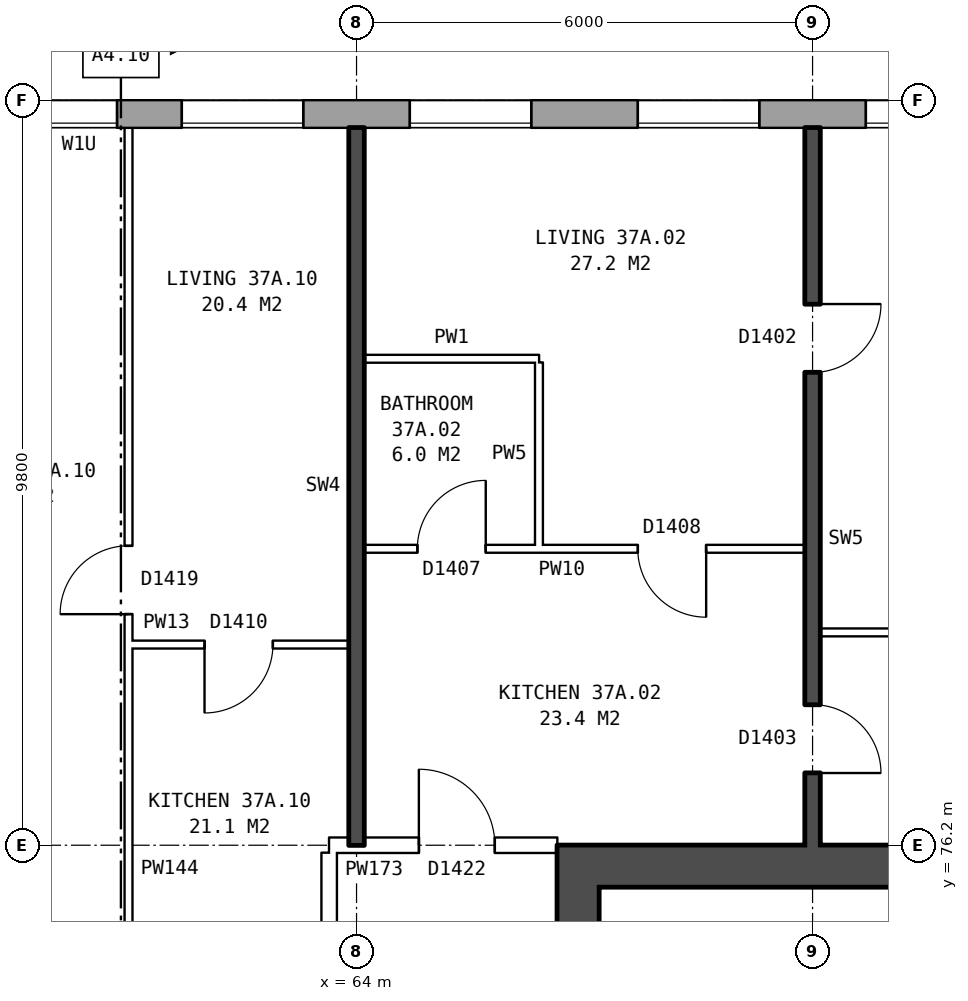
"""IFC4 building model, lengths in metres.
Left out: names, types, materials, properties, quantities, classifications, styles, units other than length and angle.
Written with IfcOpenShell. Run it as: python <this file> out.ifc"""

import sys

from ifc_helpers import new_model, si_unit, direction, frame, frame_2d, origin, place, context, subcontext, project, spatial, rectangle, extrude, element, fill, save


model = new_model("IFC4")
c1 = context("Model", 3, precision=1e-05, world=origin(), true_north=direction((0.0, 1.0)))
c2 = subcontext(c1, "Body", "Model", "MODEL_VIEW")
j1 = project(units=[si_unit("LENGTHUNIT", "METRE"), si_unit("PLANEANGLEUNIT", "RADIAN")], contexts=[c1])
p1 = place(None, origin())
s1 = spatial("IfcSite", under=j1, at=p1, CompositionType="ELEMENT")
p2 = place(p1, origin())
s2 = spatial("IfcBuilding", under=s1, at=p2, CompositionType="ELEMENT")
p3 = place(p2, frame((0.0, 0.0, 133.0)))
s3 = spatial("IfcBuildingStorey", under=s2, at=p3, CompositionType="ELEMENT", Elevation=133.0)
p4 = place(p3, frame((72.925, 85.82, 0.0), z_axis=(0.0, 0.0, 1.0), x_axis=(-1.0, 0.0, 0.0)))
e1 = element("IfcWall", 1, at=p4, inside=s3, PredefinedType="STANDARD", context=c2, shape_type="SweptSolid", body=[
    extrude(rectangle(XDim=43.101, YDim=0.36, at=frame_2d((21.55, 0.0))), origin(), (0.0, 0.0, 1.0), 2.85),
])
p5 = place(p4, frame((0.625, 0.0, 0.8)))
e2 = element("IfcOpeningElement", 2, at=p5, cuts=e1, PredefinedType="OPENING", context=c2, shape_type="SweptSolid", body=[
    extrude(rectangle(XDim=1.6, YDim=1.8, at=frame_2d((0.8, 0.9))), frame((0.0, 0.19, 0.0), z_axis=(0.0, -1.0, 0.0), x_axis=(1.0, 0.0, 0.0)), (0.0, 0.0, 1.0), 0.38),
])
p6 = place(p4, frame((3.625, 0.0, 0.8)))
e3 = element("IfcOpeningElement", 3, at=p6, cuts=e1, PredefinedType="OPENING", context=c2, shape_type="SweptSolid", body=[
    extrude(rectangle(XDim=1.6, YDim=1.8, at=frame_2d((0.8, 0.9))), frame((0.0, 0.19, 0.0), z_axis=(0.0, -1.0, 0.0), x_axis=(1.0, 0.0, 0.0)), (0.0, 0.0, 1.0), 0.38),
])
p7 = place(p4, frame((6.625, 0.0, 0.8)))
e4 = element("IfcOpeningElement", 4, at=p7, cuts=e1, PredefinedType="OPENING", context=c2, shape_type="SweptSolid", body=[
    extrude(rectangle(XDim=1.6, YDim=1.8, at=frame_2d((0.8, 0.9))), frame((0.0, 0.19, 0.0), z_axis=(0.0, -1.0, 0.0), x_axis=(1.0, 0.0, 0.0)), (0.0, 0.0, 1.0), 0.38),
])
p8 = place(p4, frame((9.625, 0.0, 0.8)))
e5 = element("IfcOpeningElement", 5, at=p8, cuts=e1, PredefinedType="OPENING", context=c2, shape_type="SweptSolid", body=[
    extrude(rectangle(XDim=1.6, YDim=1.8, at=frame_2d((0.8, 0.9))), frame((0.0, 0.19, 0.0), z_axis=(0.0, -1.0, 0.0), x_axis=(1.0, 0.0, 0.0)), (0.0, 0.0, 1.0), 0.38),
])
p9 = place(p4, frame((12.075, 0.0, 1.65)))
e6 = element("IfcOpeningElement", 6, at=p9, cuts=e1, PredefinedType="OPENING", context=c2, shape_type="SweptSolid", body=[
    extrude(rectangle(XDim=1.0, YDim=0.9, at=frame_2d((0.5, 0.45))), frame((0.0, 0.19, 0.0), z_axis=(0.0, -1.0, 0.0), x_axis=(1.0, 0.0, 0.0)), (0.0, 0.0, 1.0), 0.38),
])
p10 = place(p4, frame((15.625, 0.0, 0.8)))
e7 = element("IfcOpeningElement", 7, at=p10, cuts=e1, PredefinedType="OPENING", context=c2, shape_type="SweptSolid", body=[
    extrude(rectangle(XDim=1.6, YDim=1.8, at=frame_2d((0.8, 0.9))), frame((0.0, 0.19, 0.0), z_axis=(0.0, -1.0, 0.0), x_axis=(1.0, 0.0, 0.0)), (0.0, 0.0, 1.0), 0.38),
])
p11 = place(p4, frame((18.625, 0.0, 0.8)))
e8 = element("IfcOpeningElement", 8, at=p11, cuts=e1, PredefinedType="OPENING", context=c2, shape_type="SweptSolid", body=[
    extrude(rectangle(XDim=1.6, YDim=1.8, at=frame_2d((0.8, 0.9))), frame((0.0, 0.19, 0.0), z_axis=(0.0, -1.0, 0.0), x_axis=(1.0, 0.0, 0.0)), (0.0, 0.0, 1.0), 0.38),
])
p12 = place(p4, frame((21.625, 0.0, 0.8)))
e9 = element("IfcOpeningElement", 9, at=p12, cuts=e1, PredefinedType="OPENING", context=c2, shape_type="SweptSolid", body=[
    extrude(rectangle(XDim=1.6, YDim=1.8, at=frame_2d((0.8, 0.9))), frame((0.0, 0.19, 0.0), z_axis=(0.0, -1.0, 0.0), x_axis=(1.0, 0.0, 0.0)), (0.0, 0.0, 1.0), 0.38),
])
p13 = place(p4, frame((24.625, 0.0, 0.8)))
e10 = element("IfcOpeningElement", 10, at=p13, cuts=e1, PredefinedType="OPENING", context=c2, shape_type="SweptSolid", body=[
    extrude(rectangle(XDim=1.6, YDim=1.8, at=frame_2d((0.8, 0.9))), frame((0.0, 0.19, 0.0), z_axis=(0.0, -1.0, 0.0), x_axis=(1.0, 0.0, 0.0)), (0.0, 0.0, 1.0), 0.38),
])
p14 = place(p4, frame((27.125, 0.0, 0.8)))
e11 = element("IfcOpeningElement", 11, at=p14, cuts=e1, PredefinedType="OPENING", context=c2, shape_type="SweptSolid", body=[
    extrude(rectangle(XDim=0.6, YDim=1.8, at=frame_2d((0.3, 0.9))), frame((0.0, 0.19, 0.0), z_axis=(0.0, -1.0, 0.0), x_axis=(1.0, 0.0, 0.0)), (0.0, 0.0, 1.0), 0.38),
])
p15 = place(p4, frame((30.625, 0.0, 0.8)))
e12 = element("IfcOpeningElement", 12, at=p15, cuts=e1, PredefinedType="OPENING", context=c2, shape_type="SweptSolid", body=[
    extrude(rectangle(XDim=1.6, YDim=1.8, at=frame_2d((0.8, 0.9))), frame((0.0, 0.19, 0.0), z_axis=(0.0, -1.0, 0.0), x_axis=(1.0, 0.0, 0.0)), (0.0, 0.0, 1.0), 0.38),
])
p16 = place(p4, frame((33.625, 0.0, 0.8)))
e13 = element("IfcOpeningElement", 13, at=p16, cuts=e1, PredefinedType="OPENING", context=c2, shape_type="SweptSolid", body=[
    extrude(rectangle(XDim=1.6, YDim=1.8, at=frame_2d((0.8, 0.9))), frame((0.0, 0.19, 0.0), z_axis=(0.0, -1.0, 0.0), x_axis=(1.0, 0.0, 0.0)), (0.0, 0.0, 1.0), 0.38),
])
p17 = place(p4, frame((36.625, 0.0, 0.8)))
e14 = element("IfcOpeningElement", 14, at=p17, cuts=e1, PredefinedType="OPENING", context=c2, shape_type="SweptSolid", body=[
    extrude(rectangle(XDim=1.6, YDim=1.8, at=frame_2d((0.8, 0.9))), frame((0.0, 0.19, 0.0), z_axis=(0.0, -1.0, 0.0), x_axis=(1.0, 0.0, 0.0)), (0.0, 0.0, 1.0), 0.38),
])
p18 = place(p4, frame((39.625, 0.0, 0.8)))
e15 = element("IfcOpeningElement", 15, at=p18, cuts=e1, PredefinedType="OPENING", context=c2, shape_type="SweptSolid", body=[
    extrude(rectangle(XDim=1.6, YDim=1.8, at=frame_2d((0.8, 0.9))), frame((0.0, 0.19, 0.0), z_axis=(0.0, -1.0, 0.0), x_axis=(1.0, 0.0, 0.0)), (0.0, 0.0, 1.0), 0.38),
])
p19 = place(p4, frame((13.875, 0.0, 0.15)))
e16 = element("IfcOpeningElement", 16, at=p19, cuts=e1, PredefinedType="OPENING", context=c2, shape_type="SweptSolid", body=[
    extrude(rectangle(XDim=0.8, YDim=1.2, at=frame_2d((0.4, 0.6))), frame((0.0, 0.19, 0.0), z_axis=(0.0, -1.0, 0.0), x_axis=(1.0, 0.0, 0.0)), (0.0, 0.0, 1.0), 0.38),
])
p20 = place(p4, frame((28.025, 0.0, 0.8)))
e17 = element("IfcOpeningElement", 17, at=p20, cuts=e1, PredefinedType="OPENING", context=c2, shape_type="SweptSolid", body=[
    extrude(rectangle(XDim=0.8, YDim=0.9, at=frame_2d((0.4, 0.45))), frame((0.0, 0.19, 0.0), z_axis=(0.0, -1.0, 0.0), x_axis=(1.0, 0.0, 0.0)), (0.0, 0.0, 1.0), 0.38),
])
p21 = place(p3, frame((66.915, 63.8, 0.0), z_axis=(0.0, 0.0, 1.0), x_axis=(0.0, 1.0, 0.0)))
e18 = element("IfcWall", 18, at=p21, inside=s3, PredefinedType="SHEAR", context=c2, shape_type="SweptSolid", body=[
    extrude(rectangle(XDim=12.4, YDim=0.55, at=frame_2d((6.2, 0.0))), origin(), (0.0, 0.0, 1.0), 2.85),
])
p22 = place(p21, frame((1.325, 0.0, 0.0)))
e19 = element("IfcOpeningElement", 19, at=p22, cuts=e18, PredefinedType="OPENING", context=c2, shape_type="SweptSolid", body=[
    extrude(rectangle(XDim=1.1, YDim=2.1, at=frame_2d((0.55, 1.05))), frame((0.0, 0.285, 0.0), z_axis=(0.0, -1.0, 0.0), x_axis=(1.0, 0.0, 0.0)), (0.0, 0.0, 1.0), 0.57),
])
p23 = place(p21, frame((3.6, 0.0, 0.0)))
e20 = element("IfcOpeningElement", 20, at=p23, cuts=e18, PredefinedType="OPENING", context=c2, shape_type="SweptSolid", body=[
    extrude(rectangle(XDim=1.1, YDim=2.1, at=frame_2d((0.55, 1.05))), frame((0.0, 0.285, 0.0), z_axis=(0.0, -1.0, 0.0), x_axis=(1.0, 0.0, 0.0)), (0.0, 0.0, 1.0), 0.57),
])
p24 = place(p21, frame((5.8, 0.0, 0.0)))
e21 = element("IfcOpeningElement", 21, at=p24, cuts=e18, PredefinedType="OPENING", context=c2, shape_type="SweptSolid", body=[
    extrude(rectangle(XDim=1.1, YDim=2.1, at=frame_2d((0.55, 1.05))), frame((0.0, 0.285, 0.0), z_axis=(0.0, -1.0, 0.0), x_axis=(1.0, 0.0, 0.0)), (0.0, 0.0, 1.0), 0.57),
])
p25 = place(p21, frame((8.0, 0.0, 0.0)))
e22 = element("IfcOpeningElement", 22, at=p25, cuts=e18, PredefinedType="OPENING", context=c2, shape_type="SweptSolid", body=[
    extrude(rectangle(XDim=1.1, YDim=2.1, at=frame_2d((0.55, 1.05))), frame((0.0, 0.285, 0.0), z_axis=(0.0, -1.0, 0.0), x_axis=(1.0, 0.0, 0.0)), (0.0, 0.0, 1.0), 0.57),
])
p26 = place(p21, frame((9.9, 0.0, 0.0)))
e23 = element("IfcOpeningElement", 23, at=p26, cuts=e18, PredefinedType="OPENING", context=c2, shape_type="SweptSolid", body=[
    extrude(rectangle(XDim=1.1, YDim=2.1, at=frame_2d((0.55, 1.05))), frame((0.0, 0.285, 0.0), z_axis=(0.0, -1.0, 0.0), x_axis=(1.0, 0.0, 0.0)), (0.0, 0.0, 1.0), 0.57),
])
p27 = place(p3, frame((67.19, 75.925, 0.0), z_axis=(0.0, 0.0, 1.0), x_axis=(1.0, 0.0, 0.0)))
e24 = element("IfcWall", 24, at=p27, inside=s3, PredefinedType="SHEAR", context=c2, shape_type="SweptSolid", body=[
    extrude(rectangle(XDim=7.9, YDim=0.55, at=frame_2d((3.95, 0.0))), origin(), (0.0, 0.0, 1.0), 2.85),
])
p28 = place(p3, frame((63.64, 63.9, 0.0), z_axis=(0.0, 0.0, 1.0), x_axis=(0.0, 1.0, 0.0)))
e25 = element("IfcWall", 25, at=p28, inside=s3, PredefinedType="PARTITIONING", context=c2, shape_type="SweptSolid", body=[
    extrude(rectangle(XDim=12.2, YDim=0.2, at=frame_2d((6.1, 0.0))), origin(), (0.0, 0.0, 1.0), 2.85),
])
p29 = place(p28, frame((5.1, 0.0, 0.0)))
e26 = element("IfcOpeningElement", 26, at=p29, cuts=e25, PredefinedType="OPENING", context=c2, shape_type="SweptSolid", body=[
    extrude(rectangle(XDim=2.0, YDim=2.1, at=frame_2d((1.0, 1.05))), frame((0.0, 0.11, 0.0), z_axis=(0.0, -1.0, 0.0), x_axis=(1.0, 0.0, 0.0)), (0.0, 0.0, 1.0), 0.22),
])
p30 = place(p3, frame((63.64, 76.2, 0.0), z_axis=(0.0, 0.0, 1.0), x_axis=(1.0, 0.0, 0.0)))
e27 = element("IfcWall", 27, at=p30, inside=s3, PredefinedType="PARTITIONING", context=c2, shape_type="SweptSolid", body=[
    extrude(rectangle(XDim=3.0, YDim=0.2, at=frame_2d((1.5, 0.0))), origin(), (0.0, 0.0, 1.0), 2.85),
])
p31 = place(p30, frame((1.18, 0.0, 0.0)))
e28 = element("IfcOpeningElement", 28, at=p31, cuts=e27, PredefinedType="OPENING", context=c2, shape_type="SweptSolid", body=[
    extrude(rectangle(XDim=1.0, YDim=2.1, at=frame_2d((0.5, 1.05))), frame((0.0, 0.11, 0.0), z_axis=(0.0, -1.0, 0.0), x_axis=(1.0, 0.0, 0.0)), (0.0, 0.0, 1.0), 0.22),
])
p32 = place(p3, frame((61.0, 78.84, 0.0), z_axis=(0.0, 0.0, 1.0), x_axis=(1.0, 0.0, 0.0)))
e29 = element("IfcWall", 29, at=p32, inside=s3, PredefinedType="PARTITIONING", context=c2, shape_type="SweptSolid", body=[
    extrude(rectangle(XDim=2.9, YDim=0.1, at=frame_2d((1.45, 0.0))), origin(), (0.0, 0.0, 1.0), 2.85),
])
p33 = place(p32, frame((1.0, 0.0, 0.0)))
e30 = element("IfcOpeningElement", 30, at=p33, cuts=e29, PredefinedType="OPENING", context=c2, shape_type="SweptSolid", body=[
    extrude(rectangle(XDim=0.9, YDim=2.1, at=frame_2d((0.45, 1.05))), frame((0.0, 0.06, 0.0), z_axis=(0.0, -1.0, 0.0), x_axis=(1.0, 0.0, 0.0)), (0.0, 0.0, 1.0), 0.12),
])
p34 = place(p3, frame((70.1, 79.0, 0.0), z_axis=(0.0, 0.0, 1.0), x_axis=(1.0, 0.0, 0.0)))
e31 = element("IfcWall", 31, at=p34, inside=s3, PredefinedType="PARTITIONING", context=c2, shape_type="SweptSolid", body=[
    extrude(rectangle(XDim=5.54, YDim=0.1, at=frame_2d((2.77, 0.0))), origin(), (0.0, 0.0, 1.0), 2.85),
])
p35 = place(p3, frame((64.1, 80.1, 0.0), z_axis=(0.0, 0.0, 1.0), x_axis=(1.0, 0.0, 0.0)))
e32 = element("IfcWall", 32, at=p35, inside=s3, PredefinedType="PARTITIONING", context=c2, shape_type="SweptSolid", body=[
    extrude(rectangle(XDim=5.8, YDim=0.1, at=frame_2d((2.9, 0.0))), origin(), (0.0, 0.0, 1.0), 2.85),
])
p36 = place(p35, frame((3.6, 0.0, 0.0)))
e33 = element("IfcOpeningElement", 33, at=p36, cuts=e32, PredefinedType="OPENING", context=c2, shape_type="SweptSolid", body=[
    extrude(rectangle(XDim=0.9, YDim=2.1, at=frame_2d((0.45, 1.05))), frame((0.0, 0.06, 0.0), z_axis=(0.0, -1.0, 0.0), x_axis=(1.0, 0.0, 0.0)), (0.0, 0.0, 1.0), 0.12),
])
p37 = place(p35, frame((0.7, 0.0, 0.0)))
e34 = element("IfcOpeningElement", 34, at=p37, cuts=e32, PredefinedType="OPENING", context=c2, shape_type="SweptSolid", body=[
    extrude(rectangle(XDim=0.9, YDim=2.1, at=frame_2d((0.45, 1.05))), frame((0.0, 0.06, 0.0), z_axis=(0.0, -1.0, 0.0), x_axis=(1.0, 0.0, 0.0)), (0.0, 0.0, 1.0), 0.12),
])
p38 = place(p3, frame((64.1, 82.6, 0.0), z_axis=(0.0, 0.0, 1.0), x_axis=(1.0, 0.0, 0.0)))
e35 = element("IfcWall", 35, at=p38, inside=s3, PredefinedType="PARTITIONING", context=c2, shape_type="SweptSolid", body=[
    extrude(rectangle(XDim=2.3, YDim=0.1, at=frame_2d((1.15, 0.0))), origin(), (0.0, 0.0, 1.0), 2.85),
])
p39 = place(p3, frame((61.0, 71.3, 0.0), z_axis=(0.0, 0.0, 1.0), x_axis=(0.0, 1.0, 0.0)))
e36 = element("IfcWall", 36, at=p39, inside=s3, PredefinedType="PARTITIONING", context=c2, shape_type="SweptSolid", body=[
    extrude(rectangle(XDim=14.34, YDim=0.1, at=frame_2d((7.17, 0.0))), origin(), (0.0, 0.0, 1.0), 2.85),
])
p40 = place(p39, frame((7.94, 0.0, 0.0)))
e37 = element("IfcOpeningElement", 37, at=p40, cuts=e36, PredefinedType="OPENING", context=c2, shape_type="SweptSolid", body=[
    extrude(rectangle(XDim=0.9, YDim=2.1, at=frame_2d((0.45, 1.05))), frame((0.0, 0.06, 0.0), z_axis=(0.0, -1.0, 0.0), x_axis=(1.0, 0.0, 0.0)), (0.0, 0.0, 1.0), 0.12),
])
p41 = place(p39, frame((0.9, 0.0, 0.0)))
e38 = element("IfcOpeningElement", 38, at=p41, cuts=e36, PredefinedType="OPENING", context=c2, shape_type="SweptSolid", body=[
    extrude(rectangle(XDim=0.9, YDim=2.1, at=frame_2d((0.45, 1.05))), frame((0.0, 0.06, 0.0), z_axis=(0.0, -1.0, 0.0), x_axis=(1.0, 0.0, 0.0)), (0.0, 0.0, 1.0), 0.12),
])
p42 = place(p3, frame((64.0, 76.2, 0.0), z_axis=(0.0, 0.0, 1.0), x_axis=(0.0, 1.0, 0.0)))
e39 = element("IfcWall", 39, at=p42, inside=s3, PredefinedType="SOLIDWALL", context=c2, shape_type="SweptSolid", body=[
    extrude(rectangle(XDim=9.44, YDim=0.2, at=frame_2d((4.72, 0.0))), origin(), (0.0, 0.0, 1.0), 2.85),
])
p43 = place(p3, frame((66.4, 80.15, 0.0), z_axis=(0.0, 0.0, 1.0), x_axis=(0.0, 1.0, 0.0)))
e40 = element("IfcWall", 40, at=p43, inside=s3, PredefinedType="PARTITIONING", context=c2, shape_type="SweptSolid", body=[
    extrude(rectangle(XDim=2.4, YDim=0.1, at=frame_2d((1.2, 0.0))), origin(), (0.0, 0.0, 1.0), 2.85),
])
p44 = place(p3, frame((70.0, 76.2, 0.0), z_axis=(0.0, 0.0, 1.0), x_axis=(0.0, 1.0, 0.0)))
e41 = element("IfcWall", 41, at=p44, inside=s3, PredefinedType="SOLIDWALL", context=c2, shape_type="SweptSolid", body=[
    extrude(rectangle(XDim=9.44, YDim=0.2, at=frame_2d((4.72, 0.0))), origin(), (0.0, 0.0, 1.0), 2.85),
])
p45 = place(p44, frame((6.22, 0.0, 0.0)))
e42 = element("IfcOpeningElement", 42, at=p45, cuts=e41, PredefinedType="OPENING", context=c2, shape_type="SweptSolid", body=[
    extrude(rectangle(XDim=0.9, YDim=2.1, at=frame_2d((0.45, 1.05))), frame((0.0, 0.11, 0.0), z_axis=(0.0, -1.0, 0.0), x_axis=(1.0, 0.0, 0.0)), (0.0, 0.0, 1.0), 0.22),
])
p46 = place(p44, frame((0.95, 0.0, 0.0)))
e43 = element("IfcOpeningElement", 43, at=p46, cuts=e41, PredefinedType="OPENING", context=c2, shape_type="SweptSolid", body=[
    extrude(rectangle(XDim=0.9, YDim=2.1, at=frame_2d((0.45, 1.05))), frame((0.0, 0.11, 0.0), z_axis=(0.0, -1.0, 0.0), x_axis=(1.0, 0.0, 0.0)), (0.0, 0.0, 1.0), 0.22),
])
p47 = place(p5, origin())
e44 = element("IfcWindow", 44, at=p47, inside=s3, PartitioningType="SINGLE_PANEL", PredefinedType="WINDOW", context=c2, shape_type="SweptSolid", body=[
    extrude(rectangle(XDim=1.6, YDim=1.8, at=frame_2d((0.8, 0.9))), frame((0.0, 0.15, 0.0), z_axis=(0.0, -1.0, 0.0), x_axis=(1.0, 0.0, 0.0)), (0.0, 0.0, 1.0), 0.06),
])
fill(e2, e44)
p48 = place(p6, origin())
e45 = element("IfcWindow", 45, at=p48, inside=s3, PartitioningType="SINGLE_PANEL", PredefinedType="WINDOW", context=c2, shape_type="SweptSolid", body=[
    extrude(rectangle(XDim=1.6, YDim=1.8, at=frame_2d((0.8, 0.9))), frame((0.0, 0.15, 0.0), z_axis=(0.0, -1.0, 0.0), x_axis=(1.0, 0.0, 0.0)), (0.0, 0.0, 1.0), 0.06),
])
fill(e3, e45)
p49 = place(p7, origin())
e46 = element("IfcWindow", 46, at=p49, inside=s3, PartitioningType="SINGLE_PANEL", PredefinedType="WINDOW", context=c2, shape_type="SweptSolid", body=[
    extrude(rectangle(XDim=1.6, YDim=1.8, at=frame_2d((0.8, 0.9))), frame((0.0, 0.15, 0.0), z_axis=(0.0, -1.0, 0.0), x_axis=(1.0, 0.0, 0.0)), (0.0, 0.0, 1.0), 0.06),
])
fill(e4, e46)
p50 = place(p8, origin())
e47 = element("IfcWindow", 47, at=p50, inside=s3, PartitioningType="SINGLE_PANEL", PredefinedType="WINDOW", context=c2, shape_type="SweptSolid", body=[
    extrude(rectangle(XDim=1.6, YDim=1.8, at=frame_2d((0.8, 0.9))), frame((0.0, 0.15, 0.0), z_axis=(0.0, -1.0, 0.0), x_axis=(1.0, 0.0, 0.0)), (0.0, 0.0, 1.0), 0.06),
])
fill(e5, e47)
p51 = place(p9, origin())
e48 = element("IfcWindow", 48, at=p51, inside=s3, PartitioningType="SINGLE_PANEL", PredefinedType="WINDOW", context=c2, shape_type="SweptSolid", body=[
    extrude(rectangle(XDim=1.0, YDim=0.9, at=frame_2d((0.5, 0.45))), frame((0.0, 0.15, 0.0), z_axis=(0.0, -1.0, 0.0), x_axis=(1.0, 0.0, 0.0)), (0.0, 0.0, 1.0), 0.06),
])
fill(e6, e48)
p52 = place(p45, frame((0.9, 0.0, 0.0), z_axis=(0.0, 0.0, 1.0), x_axis=(-1.0, 0.0, 0.0)))
e49 = element("IfcDoor", 49, at=p52, inside=s3, OperationType="SINGLE_SWING_LEFT", PredefinedType="DOOR", context=c2, shape_type="SweptSolid", body=[
    extrude(rectangle(XDim=0.9, YDim=2.1, at=frame_2d((0.45, 1.05))), frame((0.0, 0.025, 0.0), z_axis=(0.0, -1.0, 0.0), x_axis=(1.0, 0.0, 0.0)), (0.0, 0.0, 1.0), 0.05),
])
fill(e42, e49)
p53 = place(p46, frame((0.9, 0.0, 0.0), z_axis=(0.0, 0.0, 1.0), x_axis=(-1.0, 0.0, 0.0)))
e50 = element("IfcDoor", 50, at=p53, inside=s3, OperationType="SINGLE_SWING_RIGHT", PredefinedType="DOOR", context=c2, shape_type="SweptSolid", body=[
    extrude(rectangle(XDim=0.9, YDim=2.1, at=frame_2d((0.45, 1.05))), frame((0.0, 0.025, 0.0), z_axis=(0.0, -1.0, 0.0), x_axis=(1.0, 0.0, 0.0)), (0.0, 0.0, 1.0), 0.05),
])
fill(e43, e50)
p54 = place(p31, origin())
e51 = element("IfcDoor", 51, at=p54, inside=s3, OperationType="SINGLE_SWING_LEFT", PredefinedType="DOOR", context=c2, shape_type="SweptSolid", body=[
    extrude(rectangle(XDim=1.0, YDim=2.1, at=frame_2d((0.5, 1.05))), frame((0.0, 0.025, 0.0), z_axis=(0.0, -1.0, 0.0), x_axis=(1.0, 0.0, 0.0)), (0.0, 0.0, 1.0), 0.05),
])
fill(e28, e51)
p55 = place(p36, frame((0.9, 0.0, 0.0), z_axis=(0.0, 0.0, 1.0), x_axis=(-1.0, 0.0, 0.0)))
e52 = element("IfcDoor", 52, at=p55, inside=s3, OperationType="SINGLE_SWING_LEFT", PredefinedType="DOOR", context=c2, shape_type="SweptSolid", body=[
    extrude(rectangle(XDim=0.9, YDim=2.1, at=frame_2d((0.45, 1.05))), frame((0.0, 0.025, 0.0), z_axis=(0.0, -1.0, 0.0), x_axis=(1.0, 0.0, 0.0)), (0.0, 0.0, 1.0), 0.05),
])
fill(e33, e52)
p56 = place(p37, origin())
e53 = element("IfcDoor", 53, at=p56, inside=s3, OperationType="SINGLE_SWING_RIGHT", PredefinedType="DOOR", context=c2, shape_type="SweptSolid", body=[
    extrude(rectangle(XDim=0.9, YDim=2.1, at=frame_2d((0.45, 1.05))), frame((0.0, 0.025, 0.0), z_axis=(0.0, -1.0, 0.0), x_axis=(1.0, 0.0, 0.0)), (0.0, 0.0, 1.0), 0.05),
])
fill(e34, e53)
p57 = place(p40, origin())
e54 = element("IfcDoor", 54, at=p57, inside=s3, OperationType="SINGLE_SWING_LEFT", PredefinedType="DOOR", context=c2, shape_type="SweptSolid", body=[
    extrude(rectangle(XDim=0.9, YDim=2.1, at=frame_2d((0.45, 1.05))), frame((0.0, 0.025, 0.0), z_axis=(0.0, -1.0, 0.0), x_axis=(1.0, 0.0, 0.0)), (0.0, 0.0, 1.0), 0.05),
])
fill(e37, e54)
p58 = place(p33, frame((0.9, 0.0, 0.0), z_axis=(0.0, 0.0, 1.0), x_axis=(-1.0, 0.0, 0.0)))
e55 = element("IfcDoor", 55, at=p58, inside=s3, OperationType="SINGLE_SWING_RIGHT", PredefinedType="DOOR", context=c2, shape_type="SweptSolid", body=[
    extrude(rectangle(XDim=0.9, YDim=2.1, at=frame_2d((0.45, 1.05))), frame((0.0, 0.025, 0.0), z_axis=(0.0, -1.0, 0.0), x_axis=(1.0, 0.0, 0.0)), (0.0, 0.0, 1.0), 0.05),
])
fill(e30, e55)
save(model, sys.argv[1])
